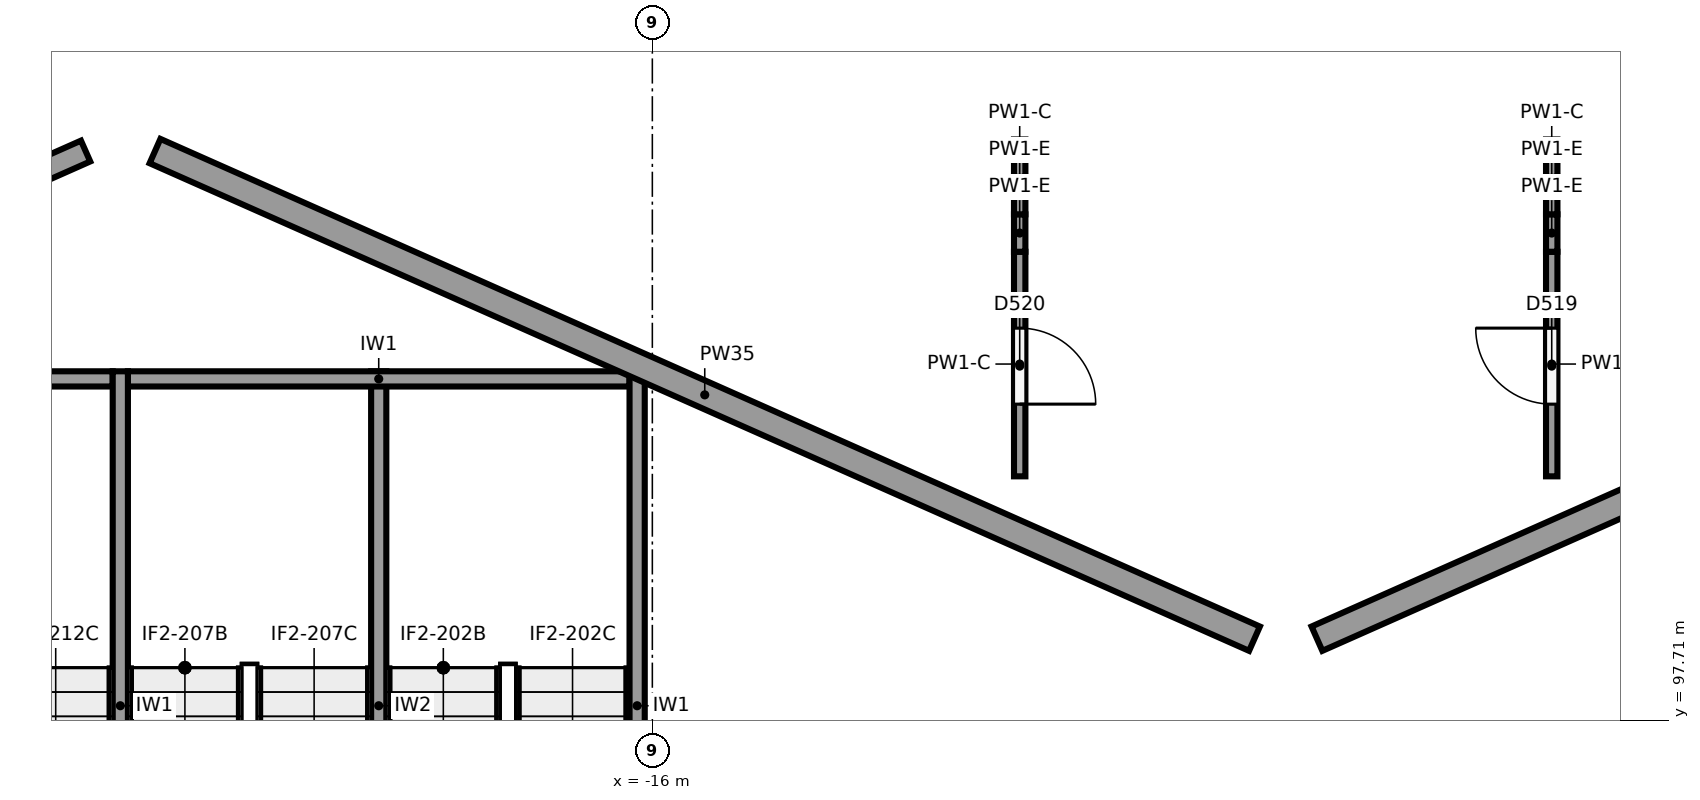
"""IFC4 building model, lengths in metres.
Left out: names, types, materials, properties, quantities, classifications, styles, units other than length and angle.
Written with IfcOpenShell. Run it as: python <this file> out.ifc"""

import sys

from ifc_helpers import new_model, si_unit, direction, frame, frame_2d, origin, origin_2d, place, context, subcontext, project, spatial, rectangle, circle, extrude, element, fill, save


model = new_model("IFC4")
c1 = context("Model", 3, precision=1e-05, world=origin(), true_north=direction((0.0, 1.0)))
c2 = subcontext(c1, "Body", "Model", "MODEL_VIEW")
j1 = project(units=[si_unit("LENGTHUNIT", "METRE"), si_unit("PLANEANGLEUNIT", "RADIAN")], contexts=[c1])
p1 = place(None, origin())
s1 = spatial("IfcSite", under=j1, at=p1, CompositionType="ELEMENT")
p2 = place(p1, origin())
s2 = spatial("IfcBuilding", under=s1, at=p2, CompositionType="ELEMENT")
p3 = place(p2, origin())
s3 = spatial("IfcBuildingStorey", under=s2, at=p3, CompositionType="ELEMENT", Elevation=0.0)
p4 = place(p3, frame((-7.667, 98.6, 0.0), z_axis=(0.0, 0.0, 1.0), x_axis=(1.0, 0.0, 0.0)))
e1 = element("IfcColumn", 1, at=p4, inside=s3, PredefinedType="COLUMN", context=c2, shape_type="SweptSolid", body=[
    extrude(circle(Radius=0.45, at=origin_2d()), origin(), (0.0, 0.0, 1.0), 6.5),
])
p5 = place(p3, frame((-23.0, 105.4, 0.0), z_axis=(0.0, 0.0, 1.0), x_axis=(1.0, 0.0, 0.0)))
e2 = element("IfcColumn", 2, at=p5, inside=s3, PredefinedType="COLUMN", context=c2, shape_type="SweptSolid", body=[
    extrude(circle(Radius=0.5, at=origin_2d()), origin(), (0.0, 0.0, 1.0), 6.5),
])
for number, where, z_axis, x_axis in (
    (3, (-7.667, 104.2, -0.3), (0.0, 0.0, 1.0), (1.0, 0.0, 0.0)),
    (4, (-16.85, 104.2, -0.3), (0.0, 0.0, 1.0), (1.0, 0.0, 0.0)),
):
    element("IfcColumn", number, at=place(p3, frame(where, z_axis=z_axis, x_axis=x_axis)), inside=s3, PredefinedType="COLUMN", context=c2, shape_type="SweptSolid", body=[
        extrude(circle(Radius=0.3, at=origin_2d()), origin(), (0.0, 0.0, 1.0), 6.8),
    ])
p6 = place(p3, frame((-7.256, 98.782, 0.0), z_axis=(0.0, 0.0, 1.0), x_axis=(0.914136361455, 0.405406848322, 0.0)))
e5 = element("IfcWall", 5, at=p6, inside=s3, PredefinedType="SOLIDWALL", context=c2, shape_type="SweptSolid", body=[
    extrude(rectangle(XDim=15.824, YDim=0.35, at=frame_2d((7.912, 0.0))), origin(), (0.0, 0.0, 1.0), 4.85),
])
p7 = place(p3, frame((-22.543, 105.198, 0.0), z_axis=(0.0, 0.0, 1.0), x_axis=(0.914138897099, -0.405401130748, 0.0)))
e6 = element("IfcWall", 6, at=p7, inside=s3, PredefinedType="SOLIDWALL", context=c2, shape_type="SweptSolid", body=[
    extrude(rectangle(XDim=15.824, YDim=0.35, at=frame_2d((7.912, 0.0))), origin(), (0.0, 0.0, 1.0), 4.85),
])
p8 = place(p3, frame((-37.922, 98.782, 0.0), z_axis=(0.0, 0.0, 1.0), x_axis=(0.914138897099, 0.405401130748, 0.0)))
e7 = element("IfcWall", 7, at=p8, inside=s3, PredefinedType="SOLIDWALL", context=c2, shape_type="SweptSolid", body=[
    extrude(rectangle(XDim=15.824, YDim=0.3, at=frame_2d((7.912, 0.0))), origin(), (0.0, 0.0, 1.0), 4.85),
])
for number, where, z_axis, x_axis in (
    (8, (-16.2, 102.3, 0.0), (0.0, 0.0, 1.0), (0.0, -1.0, 0.0)),
    (9, (-23.0, 102.3, 0.0), (0.0, 0.0, 1.0), (0.0, -1.0, 0.0)),
):
    element("IfcWall", number, at=place(p3, frame(where, z_axis=z_axis, x_axis=x_axis)), inside=s3, PredefinedType="SHEAR", context=c2, shape_type="SweptSolid", body=[
        extrude(rectangle(XDim=8.8, YDim=0.2, at=frame_2d((4.4, 0.0))), origin(), (0.0, 0.0, 1.0), 6.15),
    ])
for number, where, z_axis, x_axis in (
    (10, (-16.3, 102.2, 0.0), (0.0, 0.0, 1.0), (-1.0, 0.0, 0.0)),
    (11, (-23.1, 102.2, 0.0), (0.0, 0.0, 1.0), (-1.0, 0.0, 0.0)),
):
    element("IfcWall", number, at=place(p3, frame(where, z_axis=z_axis, x_axis=x_axis)), inside=s3, PredefinedType="SHEAR", context=c2, shape_type="SweptSolid", body=[
        extrude(rectangle(XDim=6.6, YDim=0.2, at=frame_2d((3.3, 0.0))), origin(), (0.0, 0.0, 1.0), 6.15),
    ])
p9 = place(p3, frame((-19.6, 102.3, 0.0), z_axis=(0.0, 0.0, 1.0), x_axis=(0.0, -1.0, 0.0)))
e12 = element("IfcWall", 12, at=p9, inside=s3, PredefinedType="SHEAR", context=c2, shape_type="SweptSolid", body=[
    extrude(rectangle(XDim=8.8, YDim=0.2, at=frame_2d((4.4, 0.0))), origin(), (0.0, 0.0, 1.0), 6.15),
])
p10 = place(p3, frame((-4.167, 100.918, 0.0), z_axis=(0.0, 0.0, 1.0), x_axis=(0.0, 1.0, 0.0)))
e13 = element("IfcWall", 13, at=p10, inside=s3, PredefinedType="PARTITIONING", context=c2, shape_type="SweptSolid", body=[
    extrude(rectangle(XDim=2.955, YDim=0.15, at=frame_2d((1.477, 0.0))), origin(), (0.0, 0.0, 1.0), 6.05),
])
p11 = place(p10, frame((0.95, 0.0, 0.0)))
e14 = element("IfcOpeningElement", 14, at=p11, cuts=e13, PredefinedType="OPENING", context=c2, shape_type="SweptSolid", body=[
    extrude(rectangle(XDim=1.0, YDim=2.1, at=frame_2d((0.5, 1.05))), frame((0.0, 0.085, 0.0), z_axis=(0.0, -1.0, 0.0), x_axis=(1.0, 0.0, 0.0)), (0.0, 0.0, 1.0), 0.17),
])
p12 = place(p3, frame((-4.167, 103.873, 0.0), z_axis=(0.0, 0.0, 1.0), x_axis=(0.0, 1.0, 0.0)))
e15 = element("IfcWall", 15, at=p12, inside=s3, PredefinedType="PARTITIONING", context=c2, shape_type="SweptSolid", body=[
    extrude(rectangle(XDim=0.492, YDim=0.15, at=frame_2d((0.246, 0.0))), origin(), (0.0, 0.0, 1.0), 5.25),
])
p13 = place(p3, frame((-4.167, 104.365, 0.0), z_axis=(0.0, 0.0, 1.0), x_axis=(0.0, 1.0, 0.0)))
e16 = element("IfcWall", 16, at=p13, inside=s3, PredefinedType="PARTITIONING", context=c2, shape_type="SweptSolid", body=[
    extrude(rectangle(XDim=0.493, YDim=0.15, at=frame_2d((0.246, 0.0))), origin(), (0.0, 0.0, 1.0), 5.25),
])
p14 = place(p3, frame((-4.167, 104.858, 0.0), z_axis=(0.0, 0.0, 1.0), x_axis=(0.0, 1.0, 0.0)))
e17 = element("IfcWall", 17, at=p14, inside=s3, PredefinedType="PARTITIONING", context=c2, shape_type="SweptSolid", body=[
    extrude(rectangle(XDim=0.492, YDim=0.15, at=frame_2d((0.246, 0.0))), origin(), (0.0, 0.0, 1.0), 6.05),
])
p15 = place(p3, frame((-11.167, 103.873, 0.0), z_axis=(0.0, 0.0, 1.0), x_axis=(0.0, -1.0, 0.0)))
e18 = element("IfcWall", 18, at=p15, inside=s3, PredefinedType="PARTITIONING", context=c2, shape_type="SweptSolid", body=[
    extrude(rectangle(XDim=2.955, YDim=0.15, at=frame_2d((1.477, 0.0))), origin(), (0.0, 0.0, 1.0), 6.05),
])
p16 = place(p15, frame((1.005, 0.0, 0.0)))
e19 = element("IfcOpeningElement", 19, at=p16, cuts=e18, PredefinedType="OPENING", context=c2, shape_type="SweptSolid", body=[
    extrude(rectangle(XDim=1.0, YDim=2.1, at=frame_2d((0.5, 1.05))), frame((0.0, 0.085, 0.0), z_axis=(0.0, -1.0, 0.0), x_axis=(1.0, 0.0, 0.0)), (0.0, 0.0, 1.0), 0.17),
])
p17 = place(p3, frame((-11.167, 103.873, 0.0), z_axis=(0.0, 0.0, 1.0), x_axis=(0.0, 1.0, 0.0)))
e20 = element("IfcWall", 20, at=p17, inside=s3, PredefinedType="PARTITIONING", context=c2, shape_type="SweptSolid", body=[
    extrude(rectangle(XDim=0.492, YDim=0.15, at=frame_2d((0.246, 0.0))), origin(), (0.0, 0.0, 1.0), 5.25),
])
p18 = place(p3, frame((-11.167, 104.365, 0.0), z_axis=(0.0, 0.0, 1.0), x_axis=(0.0, 1.0, 0.0)))
e21 = element("IfcWall", 21, at=p18, inside=s3, PredefinedType="PARTITIONING", context=c2, shape_type="SweptSolid", body=[
    extrude(rectangle(XDim=0.493, YDim=0.15, at=frame_2d((0.246, 0.0))), origin(), (0.0, 0.0, 1.0), 5.25),
])
p19 = place(p3, frame((-11.167, 104.858, 0.0), z_axis=(0.0, 0.0, 1.0), x_axis=(0.0, 1.0, 0.0)))
e22 = element("IfcWall", 22, at=p19, inside=s3, PredefinedType="PARTITIONING", context=c2, shape_type="SweptSolid", body=[
    extrude(rectangle(XDim=0.492, YDim=0.15, at=frame_2d((0.246, 0.0))), origin(), (0.0, 0.0, 1.0), 6.05),
])
p20 = place(p11, origin())
e23 = element("IfcDoor", 23, at=p20, inside=s3, OperationType="SINGLE_SWING_RIGHT", PredefinedType="DOOR", context=c2, shape_type="SweptSolid", body=[
    extrude(rectangle(XDim=1.0, YDim=2.1, at=frame_2d((0.5, 1.05))), frame((0.0, 0.025, 0.0), z_axis=(0.0, -1.0, 0.0), x_axis=(1.0, 0.0, 0.0)), (0.0, 0.0, 1.0), 0.05),
])
fill(e14, e23)
p21 = place(p16, origin())
e24 = element("IfcDoor", 24, at=p21, inside=s3, OperationType="SINGLE_SWING_RIGHT", PredefinedType="DOOR", context=c2, shape_type="SweptSolid", body=[
    extrude(rectangle(XDim=1.0, YDim=2.1, at=frame_2d((0.5, 1.05))), frame((0.0, 0.025, 0.0), z_axis=(0.0, -1.0, 0.0), x_axis=(1.0, 0.0, 0.0)), (0.0, 0.0, 1.0), 0.05),
])
fill(e19, e24)
save(model, sys.argv[1])
